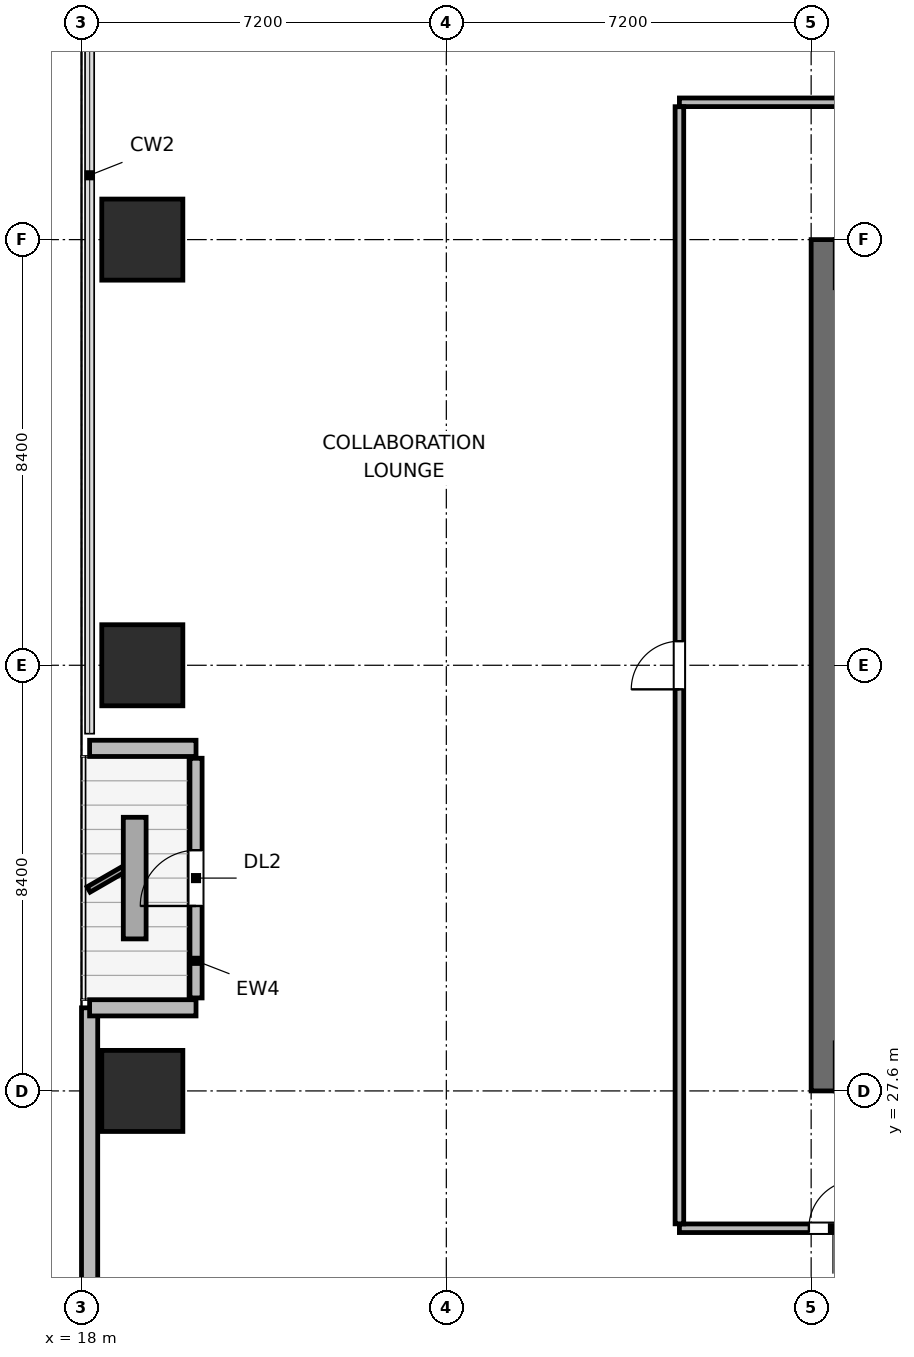
"""IFC4 building model, lengths in metres.
Left out: names, types, materials, properties, quantities, classifications, styles, units other than length and angle.
Written with IfcOpenShell. Run it as: python <this file> out.ifc"""

import sys

from ifc_helpers import new_model, si_unit, direction, frame, frame_2d, origin, origin_2d, place, context, subcontext, project, spatial, rectangle, extrude, element, fill, save


model = new_model("IFC4")
c1 = context("Model", 3, precision=1e-05, world=origin(), true_north=direction((0.0, 1.0)))
c2 = subcontext(c1, "Body", "Model", "MODEL_VIEW")
j1 = project(units=[si_unit("LENGTHUNIT", "METRE"), si_unit("PLANEANGLEUNIT", "RADIAN")], contexts=[c1])
p1 = place(None, origin())
s1 = spatial("IfcSite", under=j1, at=p1, CompositionType="ELEMENT")
p2 = place(p1, origin())
s2 = spatial("IfcBuilding", under=s1, at=p2, CompositionType="ELEMENT")
p3 = place(p2, frame((0.0, 0.0, 48.9)))
s3 = spatial("IfcBuildingStorey", under=s2, at=p3, CompositionType="ELEMENT", Elevation=48.9)
p4 = place(p3, frame((32.875, 27.6, 0.0), z_axis=(0.0, 0.0, 1.0), x_axis=(0.0, 1.0, 0.0)))
e1 = element("IfcWall", 1, at=p4, inside=s3, PredefinedType="SHEAR", context=c2, shape_type="SweptSolid", body=[
    extrude(rectangle(XDim=16.8, YDim=0.95, at=frame_2d((8.4, 0.0))), origin(), (0.0, 0.0, 1.0), 3.9),
])
for number, where, z_axis, x_axis in (
    (2, (19.2, 27.6, 0.0), (0.0, 0.0, 1.0), (1.0, 0.0, 0.0)),
    (3, (19.2, 36.0, 0.0), (0.0, 0.0, 1.0), (1.0, 0.0, 0.0)),
    (4, (19.2, 44.4, 0.0), (0.0, 0.0, 1.0), (1.0, 0.0, 0.0)),
):
    element("IfcColumn", number, at=place(p3, frame(where, z_axis=z_axis, x_axis=x_axis)), inside=s3, PredefinedType="COLUMN", context=c2, shape_type="SweptSolid", body=[
        extrude(rectangle(XDim=1.6, YDim=1.6, at=origin_2d()), origin(), (0.0, 0.0, 1.0), 3.9),
    ])
p5 = place(p3, frame((18.16, 15.021, 0.0), z_axis=(0.0, 0.0, 1.0), x_axis=(0.0, 1.0, 0.0)))
e5 = element("IfcWall", 5, at=p5, inside=s3, PredefinedType="SOLIDWALL", context=c2, shape_type="SweptSolid", body=[
    extrude(rectangle(XDim=14.219, YDim=0.32, at=frame_2d((7.109, 0.0))), origin(), (0.0, 0.0, 1.0), 3.64),
])
p6 = place(p3, frame((18.16, 29.24, 0.0), z_axis=(0.0, 0.0, 1.0), x_axis=(1.0, 0.0, 0.0)))
e6 = element("IfcWall", 6, at=p6, inside=s3, PredefinedType="SOLIDWALL", context=c2, shape_type="SweptSolid", body=[
    extrude(rectangle(XDim=2.1, YDim=0.32, at=frame_2d((1.05, 0.0))), origin(), (0.0, 0.0, 1.0), 2.875),
])
p7 = place(p3, frame((20.26, 29.435, 0.0), z_axis=(0.0, 0.0, 1.0), x_axis=(0.0, 1.0, 0.0)))
e7 = element("IfcWall", 7, at=p7, inside=s3, PredefinedType="SOLIDWALL", context=c2, shape_type="SweptSolid", body=[
    extrude(rectangle(XDim=4.73, YDim=0.24, at=frame_2d((2.365, 0.0))), origin(), (0.0, 0.0, 1.0), 3.162),
])
p8 = place(p7, frame((1.815, 0.0, 0.0)))
e8 = element("IfcOpeningElement", 8, at=p8, cuts=e7, PredefinedType="OPENING", context=c2, shape_type="SweptSolid", body=[
    extrude(rectangle(XDim=1.1, YDim=2.04, at=frame_2d((0.55, 1.02))), frame((0.0, 0.13, 0.0), z_axis=(0.0, -1.0, 0.0), x_axis=(1.0, 0.0, 0.0)), (0.0, 0.0, 1.0), 0.26),
])
p9 = place(p3, frame((20.26, 34.36, 0.0), z_axis=(0.0, 0.0, 1.0), x_axis=(-1.0, 0.0, 0.0)))
e9 = element("IfcWall", 9, at=p9, inside=s3, PredefinedType="SOLIDWALL", context=c2, shape_type="SweptSolid", body=[
    extrude(rectangle(XDim=2.1, YDim=0.32, at=frame_2d((1.05, 0.0))), origin(), (0.0, 0.0, 1.0), 2.875),
])
p10 = place(p3, frame((29.8, 24.89, 0.0), z_axis=(0.0, 0.0, 1.0), x_axis=(1.0, 0.0, 0.0)))
e10 = element("IfcWall", 10, at=p10, inside=s3, PredefinedType="PARTITIONING", context=c2, shape_type="SweptSolid", body=[
    extrude(rectangle(XDim=36.4, YDim=0.17, at=frame_2d((18.2, 0.0))), origin(), (0.0, 0.0, 1.0), 3.64),
])
p11 = place(p10, frame((2.555, 0.0, 0.0)))
e11 = element("IfcOpeningElement", 11, at=p11, cuts=e10, PredefinedType="OPENING", context=c2, shape_type="SweptSolid", body=[
    extrude(rectangle(XDim=0.95, YDim=2.04, at=frame_2d((0.475, 1.02))), frame((0.0, 0.095, 0.0), z_axis=(0.0, -1.0, 0.0), x_axis=(1.0, 0.0, 0.0)), (0.0, 0.0, 1.0), 0.19),
])
p12 = place(p10, frame((8.01, 0.0, 0.0)))
e12 = element("IfcOpeningElement", 12, at=p12, cuts=e10, PredefinedType="OPENING", context=c2, shape_type="SweptSolid", body=[
    extrude(rectangle(XDim=0.95, YDim=2.04, at=frame_2d((0.475, 1.02))), frame((0.0, 0.095, 0.0), z_axis=(0.0, -1.0, 0.0), x_axis=(1.0, 0.0, 0.0)), (0.0, 0.0, 1.0), 0.19),
])
p13 = place(p10, frame((13.18, 0.0, 0.0)))
e13 = element("IfcOpeningElement", 13, at=p13, cuts=e10, PredefinedType="OPENING", context=c2, shape_type="SweptSolid", body=[
    extrude(rectangle(XDim=0.95, YDim=2.04, at=frame_2d((0.475, 1.02))), frame((0.0, 0.095, 0.0), z_axis=(0.0, -1.0, 0.0), x_axis=(1.0, 0.0, 0.0)), (0.0, 0.0, 1.0), 0.19),
])
p14 = place(p10, frame((18.04, 0.0, 0.0)))
e14 = element("IfcOpeningElement", 14, at=p14, cuts=e10, PredefinedType="OPENING", context=c2, shape_type="SweptSolid", body=[
    extrude(rectangle(XDim=0.95, YDim=2.04, at=frame_2d((0.475, 1.02))), frame((0.0, 0.095, 0.0), z_axis=(0.0, -1.0, 0.0), x_axis=(1.0, 0.0, 0.0)), (0.0, 0.0, 1.0), 0.19),
])
p15 = place(p10, frame((22.585, 0.0, 0.0)))
e15 = element("IfcOpeningElement", 15, at=p15, cuts=e10, PredefinedType="OPENING", context=c2, shape_type="SweptSolid", body=[
    extrude(rectangle(XDim=0.95, YDim=2.04, at=frame_2d((0.475, 1.02))), frame((0.0, 0.095, 0.0), z_axis=(0.0, -1.0, 0.0), x_axis=(1.0, 0.0, 0.0)), (0.0, 0.0, 1.0), 0.19),
])
p16 = place(p10, frame((27.44, 0.0, 0.0)))
e16 = element("IfcOpeningElement", 16, at=p16, cuts=e10, PredefinedType="OPENING", context=c2, shape_type="SweptSolid", body=[
    extrude(rectangle(XDim=0.95, YDim=2.04, at=frame_2d((0.475, 1.02))), frame((0.0, 0.095, 0.0), z_axis=(0.0, -1.0, 0.0), x_axis=(1.0, 0.0, 0.0)), (0.0, 0.0, 1.0), 0.19),
])
p17 = place(p10, frame((32.895, 0.0, 0.0)))
e17 = element("IfcOpeningElement", 17, at=p17, cuts=e10, PredefinedType="OPENING", context=c2, shape_type="SweptSolid", body=[
    extrude(rectangle(XDim=0.95, YDim=2.04, at=frame_2d((0.475, 1.02))), frame((0.0, 0.095, 0.0), z_axis=(0.0, -1.0, 0.0), x_axis=(1.0, 0.0, 0.0)), (0.0, 0.0, 1.0), 0.19),
])
p18 = place(p3, frame((29.8, 47.11, 0.0), z_axis=(0.0, 0.0, 1.0), x_axis=(1.0, 0.0, 0.0)))
e18 = element("IfcWall", 18, at=p18, inside=s3, PredefinedType="PARTITIONING", context=c2, shape_type="SweptSolid", body=[
    extrude(rectangle(XDim=36.4, YDim=0.17, at=frame_2d((18.2, 0.0))), origin(), (0.0, 0.0, 1.0), 3.64),
])
p19 = place(p18, frame((4.205, 0.0, 0.0)))
e19 = element("IfcOpeningElement", 19, at=p19, cuts=e18, PredefinedType="OPENING", context=c2, shape_type="SweptSolid", body=[
    extrude(rectangle(XDim=0.95, YDim=2.04, at=frame_2d((0.475, 1.02))), frame((0.0, 0.095, 0.0), z_axis=(0.0, -1.0, 0.0), x_axis=(1.0, 0.0, 0.0)), (0.0, 0.0, 1.0), 0.19),
])
p20 = place(p18, frame((10.385, 0.0, 0.0)))
e20 = element("IfcOpeningElement", 20, at=p20, cuts=e18, PredefinedType="OPENING", context=c2, shape_type="SweptSolid", body=[
    extrude(rectangle(XDim=0.95, YDim=2.04, at=frame_2d((0.475, 1.02))), frame((0.0, 0.095, 0.0), z_axis=(0.0, -1.0, 0.0), x_axis=(1.0, 0.0, 0.0)), (0.0, 0.0, 1.0), 0.19),
])
p21 = place(p18, frame((17.005, 0.0, 0.0)))
e21 = element("IfcOpeningElement", 21, at=p21, cuts=e18, PredefinedType="OPENING", context=c2, shape_type="SweptSolid", body=[
    extrude(rectangle(XDim=0.95, YDim=2.04, at=frame_2d((0.475, 1.02))), frame((0.0, 0.095, 0.0), z_axis=(0.0, -1.0, 0.0), x_axis=(1.0, 0.0, 0.0)), (0.0, 0.0, 1.0), 0.19),
])
p22 = place(p18, frame((24.755, 0.0, 0.0)))
e22 = element("IfcOpeningElement", 22, at=p22, cuts=e18, PredefinedType="OPENING", context=c2, shape_type="SweptSolid", body=[
    extrude(rectangle(XDim=0.95, YDim=2.04, at=frame_2d((0.475, 1.02))), frame((0.0, 0.095, 0.0), z_axis=(0.0, -1.0, 0.0), x_axis=(1.0, 0.0, 0.0)), (0.0, 0.0, 1.0), 0.19),
])
p23 = place(p18, frame((31.655, 0.0, 0.0)))
e23 = element("IfcOpeningElement", 23, at=p23, cuts=e18, PredefinedType="OPENING", context=c2, shape_type="SweptSolid", body=[
    extrude(rectangle(XDim=0.95, YDim=2.04, at=frame_2d((0.475, 1.02))), frame((0.0, 0.095, 0.0), z_axis=(0.0, -1.0, 0.0), x_axis=(1.0, 0.0, 0.0)), (0.0, 0.0, 1.0), 0.19),
])
p24 = place(p3, frame((29.8, 24.977, 0.0), z_axis=(0.0, 0.0, 1.0), x_axis=(0.0, 1.0, 0.0)))
e24 = element("IfcWall", 24, at=p24, inside=s3, PredefinedType="PARTITIONING", context=c2, shape_type="SweptSolid", body=[
    extrude(rectangle(XDim=22.046, YDim=0.17, at=frame_2d((11.023, 0.0))), origin(), (0.0, 0.0, 1.0), 3.64),
])
p25 = place(p24, frame((10.548, 0.0, 0.0)))
e25 = element("IfcOpeningElement", 25, at=p25, cuts=e24, PredefinedType="OPENING", context=c2, shape_type="SweptSolid", body=[
    extrude(rectangle(XDim=0.95, YDim=2.04, at=frame_2d((0.475, 1.02))), frame((0.0, 0.095, 0.0), z_axis=(0.0, -1.0, 0.0), x_axis=(1.0, 0.0, 0.0)), (0.0, 0.0, 1.0), 0.19),
])
p26 = place(p8, origin())
e26 = element("IfcDoor", 26, at=p26, inside=s3, OperationType="SINGLE_SWING_LEFT", PredefinedType="DOOR", context=c2, shape_type="SweptSolid", body=[
    extrude(rectangle(XDim=1.1, YDim=2.04, at=frame_2d((0.55, 1.02))), frame((0.0, 0.025, 0.0), z_axis=(0.0, -1.0, 0.0), x_axis=(1.0, 0.0, 0.0)), (0.0, 0.0, 1.0), 0.05),
])
fill(e8, e26)
p27 = place(p11, origin())
e27 = element("IfcDoor", 27, at=p27, inside=s3, OperationType="SINGLE_SWING_RIGHT", PredefinedType="DOOR", context=c2, shape_type="SweptSolid", body=[
    extrude(rectangle(XDim=0.95, YDim=2.04, at=frame_2d((0.475, 1.02))), frame((0.0, 0.025, 0.0), z_axis=(0.0, -1.0, 0.0), x_axis=(1.0, 0.0, 0.0)), (0.0, 0.0, 1.0), 0.05),
])
fill(e11, e27)
p28 = place(p25, origin())
e28 = element("IfcDoor", 28, at=p28, inside=s3, OperationType="SINGLE_SWING_LEFT", PredefinedType="DOOR", context=c2, shape_type="SweptSolid", body=[
    extrude(rectangle(XDim=0.95, YDim=2.04, at=frame_2d((0.475, 1.02))), frame((0.0, 0.025, 0.0), z_axis=(0.0, -1.0, 0.0), x_axis=(1.0, 0.0, 0.0)), (0.0, 0.0, 1.0), 0.05),
])
fill(e25, e28)
save(model, sys.argv[1])
